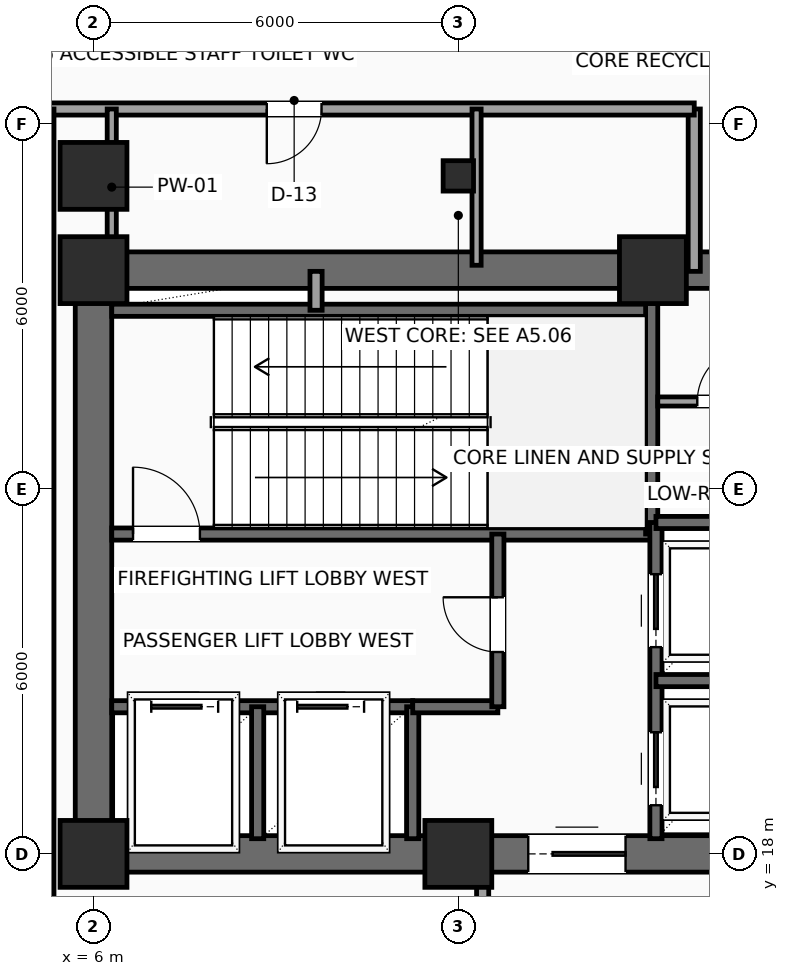
"""IFC4 building model, lengths in metres.
Left out: names, types, materials, properties, quantities, classifications, styles, units other than length and angle.
Written with IfcOpenShell. Run it as: python <this file> out.ifc"""

import sys

from ifc_helpers import new_model, si_unit, direction, frame, frame_2d, origin, origin_2d, place, context, subcontext, project, spatial, rectangle, hollow_rectangle, extrude, element, fill, save


model = new_model("IFC4")
c1 = context("Model", 3, precision=1e-05, world=origin(), true_north=direction((0.0, 1.0)))
c2 = subcontext(c1, "Body", "Model", "MODEL_VIEW")
j1 = project(units=[si_unit("LENGTHUNIT", "METRE"), si_unit("PLANEANGLEUNIT", "RADIAN")], contexts=[c1])
p1 = place(None, origin())
s1 = spatial("IfcSite", under=j1, at=p1, CompositionType="ELEMENT")
p2 = place(p1, origin())
s2 = spatial("IfcBuilding", under=s1, at=p2, CompositionType="ELEMENT")
p3 = place(p2, frame((0.0, 0.0, 110.85)))
s3 = spatial("IfcBuildingStorey", under=s2, at=p3, CompositionType="ELEMENT", Elevation=110.85)
for number, where, z_axis, x_axis in (
    (1, (6.0, 18.0, 0.0), (0.0, 0.0, 1.0), (1.0, 0.0, 0.0)),
    (2, (12.0, 18.0, 0.0), (0.0, 0.0, 1.0), (1.0, 0.0, 0.0)),
    (3, (6.0, 27.6, 0.0), (0.0, 0.0, 1.0), (1.0, 0.0, 0.0)),
    (4, (15.2, 27.6, 0.0), (0.0, 0.0, 1.0), (1.0, 0.0, 0.0)),
    (5, (6.0, 29.15, 0.0), (0.0, 0.0, 1.0), (1.0, 0.0, 0.0)),
):
    element("IfcColumn", number, at=place(p3, frame(where, z_axis=z_axis, x_axis=x_axis)), inside=s3, PredefinedType="COLUMN", context=c2, shape_type="SweptSolid", body=[
        extrude(rectangle(XDim=1.1, YDim=1.1, at=origin_2d()), origin(), (0.0, 0.0, 1.0), 4.8),
    ])
p4 = place(p3, frame((12.0, 29.15, 0.0), z_axis=(0.0, 0.0, 1.0), x_axis=(1.0, 0.0, 0.0)))
e6 = element("IfcColumn", 6, at=p4, inside=s3, PredefinedType="COLUMN", context=c2, shape_type="SweptSolid", body=[
    extrude(hollow_rectangle(XDim=0.5, YDim=0.5, WallThickness=0.025, InnerFilletRadius=0.025, OuterFilletRadius=0.04, at=origin_2d()), origin(), (0.0, 0.0, 1.0), 4.8),
])
p5 = place(p3, frame((6.0, 18.0, 0.0), z_axis=(0.0, 0.0, 1.0), x_axis=(1.0, 0.0, 0.0)))
e7 = element("IfcWall", 7, at=p5, inside=s3, PredefinedType="SHEAR", context=c2, shape_type="SweptSolid", body=[
    extrude(rectangle(XDim=12.0, YDim=0.6, at=frame_2d((6.0, 0.0))), origin(), (0.0, 0.0, 1.0), 4.575),
])
p6 = place(p5, frame((7.15, 0.0, 0.0)))
e8 = element("IfcOpeningElement", 8, at=p6, cuts=e7, PredefinedType="OPENING", context=c2, shape_type="SweptSolid", body=[
    extrude(rectangle(XDim=1.6, YDim=2.3, at=frame_2d((0.8, 1.15))), frame((0.0, 0.31, 0.0), z_axis=(0.0, -1.0, 0.0), x_axis=(1.0, 0.0, 0.0)), (0.0, 0.0, 1.0), 0.62),
])
p7 = place(p3, frame((6.0, 27.6, 0.0), z_axis=(0.0, 0.0, 1.0), x_axis=(1.0, 0.0, 0.0)))
e9 = element("IfcWall", 9, at=p7, inside=s3, PredefinedType="SHEAR", context=c2, shape_type="SweptSolid", body=[
    extrude(rectangle(XDim=12.0, YDim=0.6, at=frame_2d((6.0, 0.0))), origin(), (0.0, 0.0, 1.0), 4.575),
])
p8 = place(p7, frame((10.2, 0.0, 0.0)))
e10 = element("IfcOpeningElement", 10, at=p8, cuts=e9, PredefinedType="OPENING", context=c2, shape_type="SweptSolid", body=[
    extrude(rectangle(XDim=0.9, YDim=2.15, at=frame_2d((0.45, 1.075))), frame((0.0, 0.31, 0.0), z_axis=(0.0, -1.0, 0.0), x_axis=(1.0, 0.0, 0.0)), (0.0, 0.0, 1.0), 0.62),
])
p9 = place(p3, frame((6.0, 18.0, 0.0), z_axis=(0.0, 0.0, 1.0), x_axis=(0.0, 1.0, 0.0)))
e11 = element("IfcWall", 11, at=p9, inside=s3, PredefinedType="SHEAR", context=c2, shape_type="SweptSolid", body=[
    extrude(rectangle(XDim=9.6, YDim=0.6, at=frame_2d((4.8, 0.0))), origin(), (0.0, 0.0, 1.0), 4.575),
])
p10 = place(p3, frame((6.3, 23.26, 0.0), z_axis=(0.0, 0.0, 1.0), x_axis=(1.0, 0.0, 0.0)))
e12 = element("IfcWall", 12, at=p10, inside=s3, PredefinedType="SHEAR", context=c2, shape_type="SweptSolid", body=[
    extrude(rectangle(XDim=8.88, YDim=0.2, at=frame_2d((4.44, 0.0))), origin(), (0.0, 0.0, 1.0), 4.575),
])
p11 = place(p10, frame((0.35, 0.0, 0.0)))
e13 = element("IfcOpeningElement", 13, at=p11, cuts=e12, PredefinedType="OPENING", context=c2, shape_type="SweptSolid", body=[
    extrude(rectangle(XDim=1.1, YDim=2.2, at=frame_2d((0.55, 1.1))), frame((0.0, 0.11, 0.0), z_axis=(0.0, -1.0, 0.0), x_axis=(1.0, 0.0, 0.0)), (0.0, 0.0, 1.0), 0.22),
])
p12 = place(p3, frame((6.3, 26.94, 0.0), z_axis=(0.0, 0.0, 1.0), x_axis=(1.0, 0.0, 0.0)))
e14 = element("IfcWall", 14, at=p12, inside=s3, PredefinedType="SHEAR", context=c2, shape_type="SweptSolid", body=[
    extrude(rectangle(XDim=8.88, YDim=0.2, at=frame_2d((4.44, 0.0))), origin(), (0.0, 0.0, 1.0), 4.575),
])
p13 = place(p3, frame((15.18, 23.26, 0.0), z_axis=(0.0, 0.0, 1.0), x_axis=(0.0, 1.0, 0.0)))
e15 = element("IfcWall", 15, at=p13, inside=s3, PredefinedType="SHEAR", context=c2, shape_type="SweptSolid", body=[
    extrude(rectangle(XDim=4.04, YDim=0.2, at=frame_2d((2.02, 0.0))), origin(), (0.0, 0.0, 1.0), 4.575),
])
p14 = place(p3, frame((6.3, 20.42, 0.0), z_axis=(0.0, 0.0, 1.0), x_axis=(1.0, 0.0, 0.0)))
e16 = element("IfcWall", 16, at=p14, inside=s3, PredefinedType="SHEAR", context=c2, shape_type="SweptSolid", body=[
    extrude(rectangle(XDim=4.95, YDim=0.2, at=frame_2d((2.475, 0.0))), origin(), (0.0, 0.0, 1.0), 4.575),
])
p15 = place(p14, frame((0.65, 0.0, 0.0)))
e17 = element("IfcOpeningElement", 17, at=p15, cuts=e16, PredefinedType="OPENING", context=c2, shape_type="SweptSolid", body=[
    extrude(rectangle(XDim=1.1, YDim=2.2, at=frame_2d((0.55, 1.1))), frame((0.0, 0.11, 0.0), z_axis=(0.0, -1.0, 0.0), x_axis=(1.0, 0.0, 0.0)), (0.0, 0.0, 1.0), 0.22),
])
p16 = place(p14, frame((3.05, 0.0, 0.0)))
e18 = element("IfcOpeningElement", 18, at=p16, cuts=e16, PredefinedType="OPENING", context=c2, shape_type="SweptSolid", body=[
    extrude(rectangle(XDim=1.1, YDim=2.2, at=frame_2d((0.55, 1.1))), frame((0.0, 0.11, 0.0), z_axis=(0.0, -1.0, 0.0), x_axis=(1.0, 0.0, 0.0)), (0.0, 0.0, 1.0), 0.22),
])
for number, where, z_axis, x_axis in (
    (19, (8.7, 18.25, 0.0), (0.0, 0.0, 1.0), (0.0, 1.0, 0.0)),
    (20, (11.25, 18.25, 0.0), (0.0, 0.0, 1.0), (0.0, 1.0, 0.0)),
):
    element("IfcWall", number, at=place(p3, frame(where, z_axis=z_axis, x_axis=x_axis)), inside=s3, PredefinedType="SHEAR", context=c2, shape_type="SweptSolid", body=[
        extrude(rectangle(XDim=2.17, YDim=0.2, at=frame_2d((1.085, 0.0))), origin(), (0.0, 0.0, 1.0), 4.575),
    ])
p17 = place(p3, frame((11.25, 20.42, 0.0), z_axis=(0.0, 0.0, 1.0), x_axis=(1.0, 0.0, 0.0)))
e21 = element("IfcWall", 21, at=p17, inside=s3, PredefinedType="SHEAR", context=c2, shape_type="SweptSolid", body=[
    extrude(rectangle(XDim=1.4, YDim=0.2, at=frame_2d((0.7, 0.0))), origin(), (0.0, 0.0, 1.0), 4.575),
])
p18 = place(p3, frame((12.65, 20.42, 0.0), z_axis=(0.0, 0.0, 1.0), x_axis=(0.0, 1.0, 0.0)))
e22 = element("IfcWall", 22, at=p18, inside=s3, PredefinedType="SHEAR", context=c2, shape_type="SweptSolid", body=[
    extrude(rectangle(XDim=2.84, YDim=0.2, at=frame_2d((1.42, 0.0))), origin(), (0.0, 0.0, 1.0), 4.575),
])
p19 = place(p18, frame((0.9, 0.0, 0.0)))
e23 = element("IfcOpeningElement", 23, at=p19, cuts=e22, PredefinedType="OPENING", context=c2, shape_type="SweptSolid", body=[
    extrude(rectangle(XDim=0.9, YDim=2.15, at=frame_2d((0.45, 1.075))), frame((0.0, 0.11, 0.0), z_axis=(0.0, -1.0, 0.0), x_axis=(1.0, 0.0, 0.0)), (0.0, 0.0, 1.0), 0.22),
])
p20 = place(p3, frame((9.66, 26.94, 0.0), z_axis=(0.0, 0.0, 1.0), x_axis=(0.0, 1.0, 0.0)))
e24 = element("IfcWall", 24, at=p20, inside=s3, PredefinedType="SOLIDWALL", context=c2, shape_type="SweptSolid", body=[
    extrude(rectangle(XDim=0.64, YDim=0.2, at=frame_2d((0.32, 0.0))), origin(), (0.0, 0.0, 1.0), 4.575),
])
p21 = place(p3, frame((15.25, 18.25, 0.0), z_axis=(0.0, 0.0, 1.0), x_axis=(0.0, 1.0, 0.0)))
e25 = element("IfcWall", 25, at=p21, inside=s3, PredefinedType="SHEAR", context=c2, shape_type="SweptSolid", body=[
    extrude(rectangle(XDim=5.2, YDim=0.2, at=frame_2d((2.6, 0.0))), origin(), (0.0, 0.0, 1.0), 4.575),
])
p22 = place(p21, frame((0.55, 0.0, 0.0)))
e26 = element("IfcOpeningElement", 26, at=p22, cuts=e25, PredefinedType="OPENING", context=c2, shape_type="SweptSolid", body=[
    extrude(rectangle(XDim=1.2, YDim=2.2, at=frame_2d((0.6, 1.1))), frame((0.0, 0.11, 0.0), z_axis=(0.0, -1.0, 0.0), x_axis=(1.0, 0.0, 0.0)), (0.0, 0.0, 1.0), 0.22),
])
p23 = place(p21, frame((3.15, 0.0, 0.0)))
e27 = element("IfcOpeningElement", 27, at=p23, cuts=e25, PredefinedType="OPENING", context=c2, shape_type="SweptSolid", body=[
    extrude(rectangle(XDim=1.2, YDim=2.2, at=frame_2d((0.6, 1.1))), frame((0.0, 0.11, 0.0), z_axis=(0.0, -1.0, 0.0), x_axis=(1.0, 0.0, 0.0)), (0.0, 0.0, 1.0), 0.22),
])
p24 = place(p3, frame((15.25, 20.85, 0.0), z_axis=(0.0, 0.0, 1.0), x_axis=(1.0, 0.0, 0.0)))
e28 = element("IfcWall", 28, at=p24, inside=s3, PredefinedType="SHEAR", context=c2, shape_type="SweptSolid", body=[
    extrude(rectangle(XDim=2.4, YDim=0.2, at=frame_2d((1.2, 0.0))), origin(), (0.0, 0.0, 1.0), 4.575),
])
p25 = place(p3, frame((15.25, 23.45, 0.0), z_axis=(0.0, 0.0, 1.0), x_axis=(1.0, 0.0, 0.0)))
e29 = element("IfcWall", 29, at=p25, inside=s3, PredefinedType="SHEAR", context=c2, shape_type="SweptSolid", body=[
    extrude(rectangle(XDim=2.45, YDim=0.2, at=frame_2d((1.225, 0.0))), origin(), (0.0, 0.0, 1.0), 4.575),
])
p26 = place(p3, frame((15.28, 25.44, 0.0), z_axis=(0.0, 0.0, 1.0), x_axis=(1.0, 0.0, 0.0)))
e30 = element("IfcWall", 30, at=p26, inside=s3, PredefinedType="PARTITIONING", context=c2, shape_type="SweptSolid", body=[
    extrude(rectangle(XDim=2.42, YDim=0.15, at=frame_2d((1.21, 0.0))), origin(), (0.0, 0.0, 1.0), 4.575),
])
p27 = place(p26, frame((0.65, 0.0, 0.0)))
e31 = element("IfcOpeningElement", 31, at=p27, cuts=e30, PredefinedType="OPENING", context=c2, shape_type="SweptSolid", body=[
    extrude(rectangle(XDim=0.9, YDim=2.15, at=frame_2d((0.45, 1.075))), frame((0.0, 0.085, 0.0), z_axis=(0.0, -1.0, 0.0), x_axis=(1.0, 0.0, 0.0)), (0.0, 0.0, 1.0), 0.17),
])
p28 = place(p3, frame((15.88, 27.58, 0.0), z_axis=(0.0, 0.0, 1.0), x_axis=(0.0, 1.0, 0.0)))
e32 = element("IfcWall", 32, at=p28, inside=s3, PredefinedType="PARTITIONING", context=c2, shape_type="SweptSolid", body=[
    extrude(rectangle(XDim=2.67, YDim=0.2, at=frame_2d((1.335, 0.0))), origin(), (0.0, 0.0, 1.0), 4.575),
])
p29 = place(p3, frame((15.88, 30.25, 0.0), z_axis=(0.0, 0.0, 1.0), x_axis=(-1.0, 0.0, 0.0)))
e33 = element("IfcWall", 33, at=p29, inside=s3, PredefinedType="PARTITIONING", context=c2, shape_type="SweptSolid", body=[
    extrude(rectangle(XDim=10.63, YDim=0.2, at=frame_2d((5.315, 0.0))), origin(), (0.0, 0.0, 1.0), 4.575),
])
p30 = place(p29, frame((6.13, 0.0, 0.0)))
e34 = element("IfcOpeningElement", 34, at=p30, cuts=e33, PredefinedType="OPENING", context=c2, shape_type="SweptSolid", body=[
    extrude(rectangle(XDim=0.9, YDim=2.1, at=frame_2d((0.45, 1.05))), frame((0.0, 0.11, 0.0), z_axis=(0.0, -1.0, 0.0), x_axis=(1.0, 0.0, 0.0)), (0.0, 0.0, 1.0), 0.22),
])
p31 = place(p3, frame((5.25, 30.25, 0.0), z_axis=(0.0, 0.0, 1.0), x_axis=(0.0, -1.0, 0.0)))
e35 = element("IfcWall", 35, at=p31, inside=s3, PredefinedType="PARTITIONING", context=c2, shape_type="SweptSolid", body=[
    extrude(rectangle(XDim=13.1, YDim=0.2, at=frame_2d((6.55, 0.0))), origin(), (0.0, 0.0, 1.0), 4.575),
])
p32 = place(p3, frame((12.4, 17.15, 0.0), z_axis=(0.0, 0.0, 1.0), x_axis=(0.0, 1.0, 0.0)))
e36 = element("IfcWall", 36, at=p32, inside=s3, PredefinedType="PARTITIONING", context=c2, shape_type="SweptSolid", body=[
    extrude(rectangle(XDim=0.8, YDim=0.2, at=frame_2d((0.4, 0.0))), origin(), (0.0, 0.0, 1.0), 4.575),
])
for number, where, z_axis, x_axis in (
    (37, (6.3, 27.68, 0.0), (0.0, 0.0, 1.0), (0.0, 1.0, 0.0)),
    (38, (12.3, 27.68, 0.0), (0.0, 0.0, 1.0), (0.0, 1.0, 0.0)),
):
    element("IfcWall", number, at=place(p3, frame(where, z_axis=z_axis, x_axis=x_axis)), inside=s3, PredefinedType="PARTITIONING", context=c2, shape_type="SweptSolid", body=[
        extrude(rectangle(XDim=2.57, YDim=0.15, at=frame_2d((1.285, 0.0))), origin(), (0.0, 0.0, 1.0), 4.067),
    ])
p33 = place(p6, origin())
e39 = element("IfcDoor", 39, at=p33, inside=s3, OperationType="DOUBLE_DOOR_SLIDING", PredefinedType="DOOR", context=c2, shape_type="SweptSolid", body=[
    extrude(rectangle(XDim=1.6, YDim=2.3, at=frame_2d((0.8, 1.15))), frame((0.0, 0.025, 0.0), z_axis=(0.0, -1.0, 0.0), x_axis=(1.0, 0.0, 0.0)), (0.0, 0.0, 1.0), 0.05),
])
fill(e8, e39)
p34 = place(p11, origin())
e40 = element("IfcDoor", 40, at=p34, inside=s3, OperationType="SINGLE_SWING_LEFT", PredefinedType="DOOR", context=c2, shape_type="SweptSolid", body=[
    extrude(rectangle(XDim=1.1, YDim=2.2, at=frame_2d((0.55, 1.1))), frame((0.0, 0.025, 0.0), z_axis=(0.0, -1.0, 0.0), x_axis=(1.0, 0.0, 0.0)), (0.0, 0.0, 1.0), 0.05),
])
fill(e13, e40)
p35 = place(p15, origin())
e41 = element("IfcDoor", 41, at=p35, inside=s3, OperationType="SLIDING_TO_LEFT", PredefinedType="DOOR", context=c2, shape_type="SweptSolid", body=[
    extrude(rectangle(XDim=1.1, YDim=2.2, at=frame_2d((0.55, 1.1))), frame((0.0, 0.025, 0.0), z_axis=(0.0, -1.0, 0.0), x_axis=(1.0, 0.0, 0.0)), (0.0, 0.0, 1.0), 0.05),
])
fill(e17, e41)
p36 = place(p16, origin())
e42 = element("IfcDoor", 42, at=p36, inside=s3, OperationType="SLIDING_TO_LEFT", PredefinedType="DOOR", context=c2, shape_type="SweptSolid", body=[
    extrude(rectangle(XDim=1.1, YDim=2.2, at=frame_2d((0.55, 1.1))), frame((0.0, 0.025, 0.0), z_axis=(0.0, -1.0, 0.0), x_axis=(1.0, 0.0, 0.0)), (0.0, 0.0, 1.0), 0.05),
])
fill(e18, e42)
p37 = place(p19, origin())
e43 = element("IfcDoor", 43, at=p37, inside=s3, OperationType="SINGLE_SWING_RIGHT", PredefinedType="DOOR", context=c2, shape_type="SweptSolid", body=[
    extrude(rectangle(XDim=0.9, YDim=2.15, at=frame_2d((0.45, 1.075))), frame((0.0, 0.025, 0.0), z_axis=(0.0, -1.0, 0.0), x_axis=(1.0, 0.0, 0.0)), (0.0, 0.0, 1.0), 0.05),
])
fill(e23, e43)
p38 = place(p22, origin())
e44 = element("IfcDoor", 44, at=p38, inside=s3, OperationType="SLIDING_TO_RIGHT", PredefinedType="DOOR", context=c2, shape_type="SweptSolid", body=[
    extrude(rectangle(XDim=1.2, YDim=2.2, at=frame_2d((0.6, 1.1))), frame((0.0, 0.025, 0.0), z_axis=(0.0, -1.0, 0.0), x_axis=(1.0, 0.0, 0.0)), (0.0, 0.0, 1.0), 0.05),
])
fill(e26, e44)
p39 = place(p23, origin())
e45 = element("IfcDoor", 45, at=p39, inside=s3, OperationType="SLIDING_TO_RIGHT", PredefinedType="DOOR", context=c2, shape_type="SweptSolid", body=[
    extrude(rectangle(XDim=1.2, YDim=2.2, at=frame_2d((0.6, 1.1))), frame((0.0, 0.025, 0.0), z_axis=(0.0, -1.0, 0.0), x_axis=(1.0, 0.0, 0.0)), (0.0, 0.0, 1.0), 0.05),
])
fill(e27, e45)
p40 = place(p27, origin())
e46 = element("IfcDoor", 46, at=p40, inside=s3, OperationType="SINGLE_SWING_RIGHT", PredefinedType="DOOR", context=c2, shape_type="SweptSolid", body=[
    extrude(rectangle(XDim=0.9, YDim=2.15, at=frame_2d((0.45, 1.075))), frame((0.0, 0.025, 0.0), z_axis=(0.0, -1.0, 0.0), x_axis=(1.0, 0.0, 0.0)), (0.0, 0.0, 1.0), 0.05),
])
fill(e31, e46)
p41 = place(p30, origin())
e47 = element("IfcDoor", 47, at=p41, inside=s3, OperationType="SINGLE_SWING_RIGHT", PredefinedType="DOOR", context=c2, shape_type="SweptSolid", body=[
    extrude(rectangle(XDim=0.9, YDim=2.1, at=frame_2d((0.45, 1.05))), frame((0.0, 0.025, 0.0), z_axis=(0.0, -1.0, 0.0), x_axis=(1.0, 0.0, 0.0)), (0.0, 0.0, 1.0), 0.05),
])
fill(e34, e47)
save(model, sys.argv[1])
